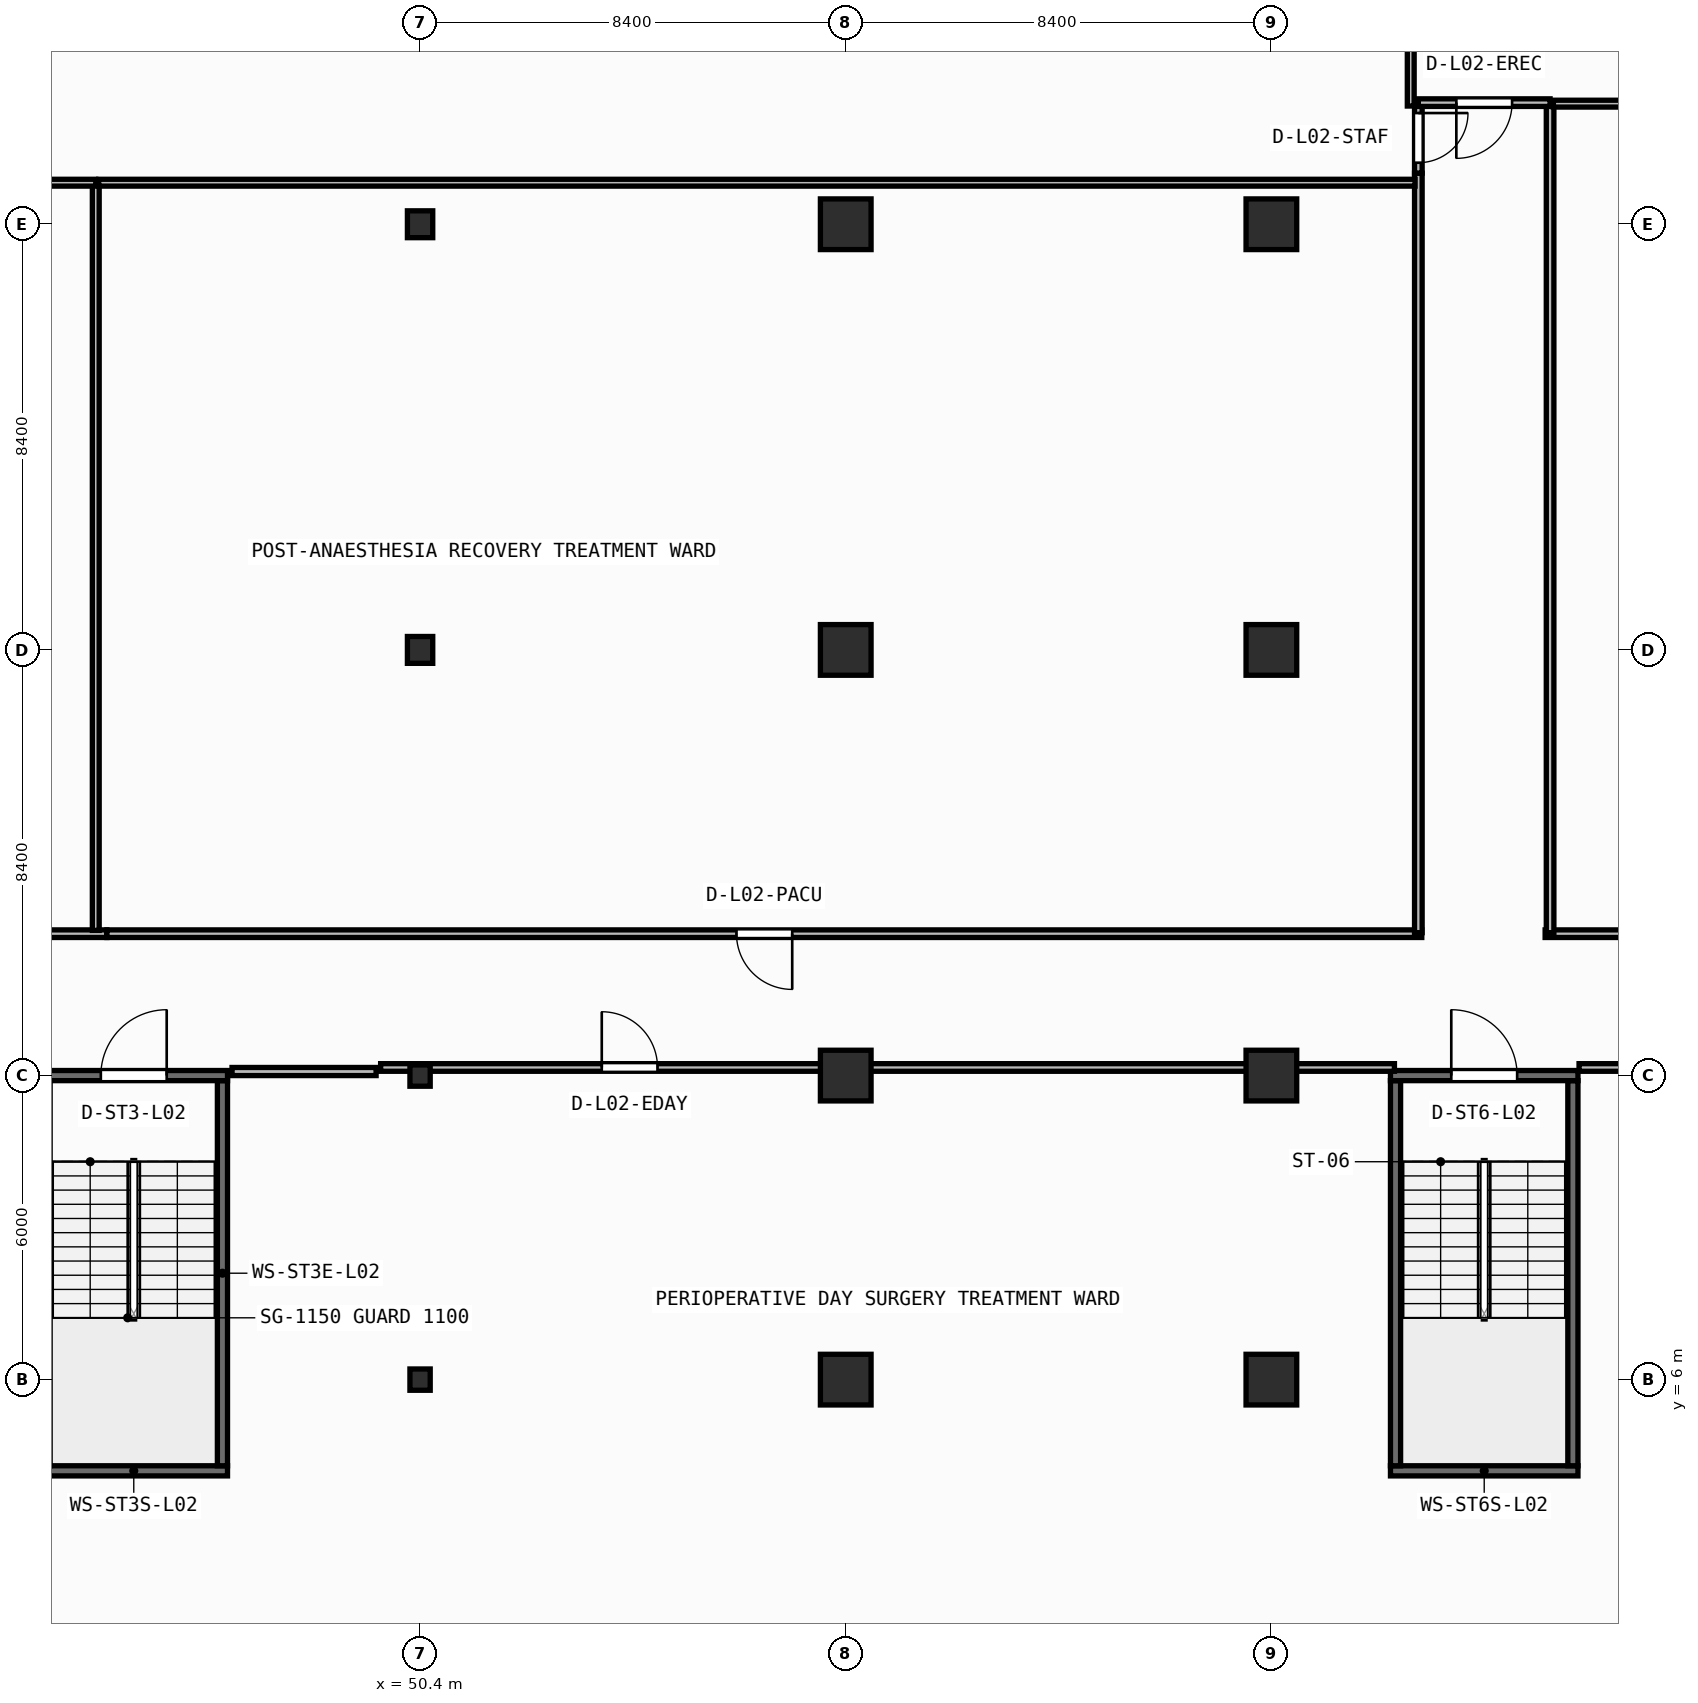
"""IFC4 building model, lengths in metres.
Left out: names, types, materials, properties, quantities, classifications, styles, units other than length and angle.
Written with IfcOpenShell. Run it as: python <this file> out.ifc"""

import sys

from ifc_helpers import new_model, si_unit, direction, frame, frame_2d, origin, origin_2d, place, context, subcontext, project, spatial, rectangle, circle, i_section, extrude, element, fill, save


model = new_model("IFC4")
c1 = context("Model", 3, precision=1e-05, world=origin(), true_north=direction((0.0, 1.0)))
c2 = subcontext(c1, "Body", "Model", "MODEL_VIEW")
j1 = project(units=[si_unit("LENGTHUNIT", "METRE"), si_unit("PLANEANGLEUNIT", "RADIAN")], contexts=[c1])
p1 = place(None, origin())
s1 = spatial("IfcSite", under=j1, at=p1, CompositionType="ELEMENT")
p2 = place(p1, origin())
s2 = spatial("IfcBuilding", under=s1, at=p2, CompositionType="ELEMENT")
p3 = place(p2, frame((0.0, 0.0, 9.0)))
s3 = spatial("IfcBuildingStorey", under=s2, at=p3, CompositionType="ELEMENT", Elevation=9.0)
p4 = place(p3, frame((50.4, 6.0, 0.0), z_axis=(0.0, 0.0, 1.0), x_axis=(1.0, 0.0, 0.0)))
e1 = element("IfcColumn", 1, at=p4, inside=s3, PredefinedType="COLUMN", context=c2, shape_type="SweptSolid", body=[
    extrude(i_section(OverallWidth=0.4, OverallDepth=0.42, WebThickness=0.025, FlangeThickness=0.04, at=origin_2d()), origin(), (0.0, 0.0, 1.0), 4.5),
])
for number, where, z_axis, x_axis in (
    (2, (58.8, 6.0, 0.0), (0.0, 0.0, 1.0), (1.0, 0.0, 0.0)),
    (3, (67.2, 6.0, 0.0), (0.0, 0.0, 1.0), (1.0, 0.0, 0.0)),
):
    element("IfcColumn", number, at=place(p3, frame(where, z_axis=z_axis, x_axis=x_axis)), inside=s3, PredefinedType="COLUMN", context=c2, shape_type="SweptSolid", body=[
        extrude(circle(Radius=0.5, at=origin_2d()), origin(), (0.0, 0.0, 1.0), 4.5),
    ])
p5 = place(p3, frame((50.4, 12.0, 0.0), z_axis=(0.0, 0.0, 1.0), x_axis=(1.0, 0.0, 0.0)))
e4 = element("IfcColumn", 4, at=p5, inside=s3, PredefinedType="COLUMN", context=c2, shape_type="SweptSolid", body=[
    extrude(i_section(OverallWidth=0.4, OverallDepth=0.42, WebThickness=0.025, FlangeThickness=0.04, at=origin_2d()), origin(), (0.0, 0.0, 1.0), 4.5),
])
for number, where, z_axis, x_axis in (
    (5, (58.8, 12.0, 0.0), (0.0, 0.0, 1.0), (1.0, 0.0, 0.0)),
    (6, (67.2, 12.0, 0.0), (0.0, 0.0, 1.0), (1.0, 0.0, 0.0)),
):
    element("IfcColumn", number, at=place(p3, frame(where, z_axis=z_axis, x_axis=x_axis)), inside=s3, PredefinedType="COLUMN", context=c2, shape_type="SweptSolid", body=[
        extrude(circle(Radius=0.5, at=origin_2d()), origin(), (0.0, 0.0, 1.0), 4.5),
    ])
p6 = place(p3, frame((50.4, 20.4, 0.0), z_axis=(0.0, 0.0, 1.0), x_axis=(1.0, 0.0, 0.0)))
e7 = element("IfcColumn", 7, at=p6, inside=s3, PredefinedType="COLUMN", context=c2, shape_type="SweptSolid", body=[
    extrude(i_section(OverallWidth=0.5, OverallDepth=0.53, WebThickness=0.028, FlangeThickness=0.045, at=origin_2d()), origin(), (0.0, 0.0, 1.0), 4.5),
])
for number, where, z_axis, x_axis in (
    (8, (58.8, 20.4, 0.0), (0.0, 0.0, 1.0), (1.0, 0.0, 0.0)),
    (9, (67.2, 20.4, 0.0), (0.0, 0.0, 1.0), (1.0, 0.0, 0.0)),
):
    element("IfcColumn", number, at=place(p3, frame(where, z_axis=z_axis, x_axis=x_axis)), inside=s3, PredefinedType="COLUMN", context=c2, shape_type="SweptSolid", body=[
        extrude(circle(Radius=0.5, at=origin_2d()), origin(), (0.0, 0.0, 1.0), 4.5),
    ])
p7 = place(p3, frame((50.4, 28.8, 0.0), z_axis=(0.0, 0.0, 1.0), x_axis=(1.0, 0.0, 0.0)))
e10 = element("IfcColumn", 10, at=p7, inside=s3, PredefinedType="COLUMN", context=c2, shape_type="SweptSolid", body=[
    extrude(i_section(OverallWidth=0.5, OverallDepth=0.53, WebThickness=0.028, FlangeThickness=0.045, at=origin_2d()), origin(), (0.0, 0.0, 1.0), 4.5),
])
for number, where, z_axis, x_axis in (
    (11, (58.8, 28.8, 0.0), (0.0, 0.0, 1.0), (1.0, 0.0, 0.0)),
    (12, (67.2, 28.8, 0.0), (0.0, 0.0, 1.0), (1.0, 0.0, 0.0)),
):
    element("IfcColumn", number, at=place(p3, frame(where, z_axis=z_axis, x_axis=x_axis)), inside=s3, PredefinedType="COLUMN", context=c2, shape_type="SweptSolid", body=[
        extrude(circle(Radius=0.5, at=origin_2d()), origin(), (0.0, 0.0, 1.0), 4.5),
    ])
p8 = place(p3, frame((42.9, 4.2, 0.0), z_axis=(0.0, 0.0, 1.0), x_axis=(1.0, 0.0, 0.0)))
e13 = element("IfcWall", 13, at=p8, inside=s3, PredefinedType="SHEAR", context=c2, shape_type="SweptSolid", body=[
    extrude(rectangle(XDim=3.7, YDim=0.2, at=frame_2d((1.85, 0.0))), origin(), (0.0, 0.0, 1.0), 4.25),
])
p9 = place(p3, frame((46.5, 4.3, 0.0), z_axis=(0.0, 0.0, 1.0), x_axis=(0.0, 1.0, 0.0)))
e14 = element("IfcWall", 14, at=p9, inside=s3, PredefinedType="SHEAR", context=c2, shape_type="SweptSolid", body=[
    extrude(rectangle(XDim=7.6, YDim=0.2, at=frame_2d((3.8, 0.0))), origin(), (0.0, 0.0, 1.0), 4.25),
])
p10 = place(p3, frame((42.9, 12.0, 0.0), z_axis=(0.0, 0.0, 1.0), x_axis=(1.0, 0.0, 0.0)))
e15 = element("IfcWall", 15, at=p10, inside=s3, PredefinedType="SHEAR", context=c2, shape_type="SweptSolid", body=[
    extrude(rectangle(XDim=3.7, YDim=0.2, at=frame_2d((1.85, 0.0))), origin(), (0.0, 0.0, 1.0), 4.25),
])
p11 = place(p10, frame((1.2, 0.0, 0.0)))
e16 = element("IfcOpeningElement", 16, at=p11, cuts=e15, PredefinedType="OPENING", context=c2, shape_type="SweptSolid", body=[
    extrude(rectangle(XDim=1.3, YDim=2.15, at=frame_2d((0.65, 1.075))), frame((0.0, 0.11, 0.0), z_axis=(0.0, -1.0, 0.0), x_axis=(1.0, 0.0, 0.0)), (0.0, 0.0, 1.0), 0.22),
])
p12 = place(p3, frame((69.55, 4.2, 0.0), z_axis=(0.0, 0.0, 1.0), x_axis=(1.0, 0.0, 0.0)))
e17 = element("IfcWall", 17, at=p12, inside=s3, PredefinedType="SHEAR", context=c2, shape_type="SweptSolid", body=[
    extrude(rectangle(XDim=3.7, YDim=0.2, at=frame_2d((1.85, 0.0))), origin(), (0.0, 0.0, 1.0), 4.25),
])
for number, where, z_axis, x_axis in (
    (18, (69.65, 4.3, 0.0), (0.0, 0.0, 1.0), (0.0, 1.0, 0.0)),
    (19, (73.15, 4.3, 0.0), (0.0, 0.0, 1.0), (0.0, 1.0, 0.0)),
):
    element("IfcWall", number, at=place(p3, frame(where, z_axis=z_axis, x_axis=x_axis)), inside=s3, PredefinedType="SHEAR", context=c2, shape_type="SweptSolid", body=[
        extrude(rectangle(XDim=7.6, YDim=0.2, at=frame_2d((3.8, 0.0))), origin(), (0.0, 0.0, 1.0), 4.25),
    ])
p13 = place(p3, frame((69.55, 12.0, 0.0), z_axis=(0.0, 0.0, 1.0), x_axis=(1.0, 0.0, 0.0)))
e20 = element("IfcWall", 20, at=p13, inside=s3, PredefinedType="SHEAR", context=c2, shape_type="SweptSolid", body=[
    extrude(rectangle(XDim=3.7, YDim=0.2, at=frame_2d((1.85, 0.0))), origin(), (0.0, 0.0, 1.0), 4.25),
])
p14 = place(p13, frame((1.2, 0.0, 0.0)))
e21 = element("IfcOpeningElement", 21, at=p14, cuts=e20, PredefinedType="OPENING", context=c2, shape_type="SweptSolid", body=[
    extrude(rectangle(XDim=1.3, YDim=2.15, at=frame_2d((0.65, 1.075))), frame((0.0, 0.11, 0.0), z_axis=(0.0, -1.0, 0.0), x_axis=(1.0, 0.0, 0.0)), (0.0, 0.0, 1.0), 0.22),
])
p15 = place(p3, frame((49.622, 12.16, 0.0), z_axis=(0.0, 0.0, 1.0), x_axis=(1.0, 0.0, 0.0)))
e22 = element("IfcWall", 22, at=p15, inside=s3, PredefinedType="PARTITIONING", context=c2, shape_type="SweptSolid", body=[
    extrude(rectangle(XDim=20.007, YDim=0.15, at=frame_2d((10.003, 0.0))), origin(), (0.0, 0.0, 1.0), 3.425),
])
p16 = place(p15, frame((4.364, 0.0, 0.0)))
e23 = element("IfcOpeningElement", 23, at=p16, cuts=e22, PredefinedType="OPENING", context=c2, shape_type="SweptSolid", body=[
    extrude(rectangle(XDim=1.1, YDim=2.1, at=frame_2d((0.55, 1.05))), frame((0.0, 0.085, 0.0), z_axis=(0.0, -1.0, 0.0), x_axis=(1.0, 0.0, 0.0)), (0.0, 0.0, 1.0), 0.17),
])
p17 = place(p3, frame((73.271, 12.16, 0.0), z_axis=(0.0, 0.0, 1.0), x_axis=(1.0, 0.0, 0.0)))
e24 = element("IfcWall", 24, at=p17, inside=s3, PredefinedType="PARTITIONING", context=c2, shape_type="SweptSolid", body=[
    extrude(rectangle(XDim=11.229, YDim=0.15, at=frame_2d((5.614, 0.0))), origin(), (0.0, 0.0, 1.0), 3.425),
])
p18 = place(p17, frame((6.037, 0.0, 0.0)))
e25 = element("IfcOpeningElement", 25, at=p18, cuts=e24, PredefinedType="OPENING", context=c2, shape_type="SweptSolid", body=[
    extrude(rectangle(XDim=1.1, YDim=2.1, at=frame_2d((0.55, 1.05))), frame((0.0, 0.085, 0.0), z_axis=(0.0, -1.0, 0.0), x_axis=(1.0, 0.0, 0.0)), (0.0, 0.0, 1.0), 0.17),
])
p19 = place(p3, frame((44.218, 14.8, 0.0), z_axis=(0.0, 0.0, 1.0), x_axis=(-1.0, 0.0, 0.0)))
e26 = element("IfcWall", 26, at=p19, inside=s3, PredefinedType="PARTITIONING", context=c2, shape_type="SweptSolid", body=[
    extrude(rectangle(XDim=22.998, YDim=0.15, at=frame_2d((11.499, 0.0))), origin(), (0.0, 0.0, 1.0), 4.25),
])
p20 = place(p19, frame((10.949, 0.0, 0.0)))
e27 = element("IfcOpeningElement", 27, at=p20, cuts=e26, PredefinedType="OPENING", context=c2, shape_type="SweptSolid", body=[
    extrude(rectangle(XDim=1.1, YDim=2.1, at=frame_2d((0.55, 1.05))), frame((0.0, 0.085, 0.0), z_axis=(0.0, -1.0, 0.0), x_axis=(1.0, 0.0, 0.0)), (0.0, 0.0, 1.0), 0.17),
])
p21 = place(p3, frame((70.168, 14.8, 0.0), z_axis=(0.0, 0.0, 1.0), x_axis=(-1.0, 0.0, 0.0)))
e28 = element("IfcWall", 28, at=p21, inside=s3, PredefinedType="PARTITIONING", context=c2, shape_type="SweptSolid", body=[
    extrude(rectangle(XDim=25.948, YDim=0.15, at=frame_2d((12.974, 0.0))), origin(), (0.0, 0.0, 1.0), 4.25),
])
p22 = place(p21, frame((12.424, 0.0, 0.0)))
e29 = element("IfcOpeningElement", 29, at=p22, cuts=e28, PredefinedType="OPENING", context=c2, shape_type="SweptSolid", body=[
    extrude(rectangle(XDim=1.1, YDim=2.1, at=frame_2d((0.55, 1.05))), frame((0.0, 0.085, 0.0), z_axis=(0.0, -1.0, 0.0), x_axis=(1.0, 0.0, 0.0)), (0.0, 0.0, 1.0), 0.17),
])
p23 = place(p3, frame((84.5, 14.8, 0.0), z_axis=(0.0, 0.0, 1.0), x_axis=(-1.0, 0.0, 0.0)))
e30 = element("IfcWall", 30, at=p23, inside=s3, PredefinedType="PARTITIONING", context=c2, shape_type="SweptSolid", body=[
    extrude(rectangle(XDim=11.898, YDim=0.15, at=frame_2d((5.949, 0.0))), origin(), (0.0, 0.0, 1.0), 4.25),
])
p24 = place(p23, frame((5.399, 0.0, 0.0)))
e31 = element("IfcOpeningElement", 31, at=p24, cuts=e30, PredefinedType="OPENING", context=c2, shape_type="SweptSolid", body=[
    extrude(rectangle(XDim=1.1, YDim=2.1, at=frame_2d((0.55, 1.05))), frame((0.0, 0.085, 0.0), z_axis=(0.0, -1.0, 0.0), x_axis=(1.0, 0.0, 0.0)), (0.0, 0.0, 1.0), 0.17),
])
p25 = place(p3, frame((70.1, 29.807, 0.0), z_axis=(0.0, 0.0, 1.0), x_axis=(0.0, -1.0, 0.0)))
e32 = element("IfcWall", 32, at=p25, inside=s3, PredefinedType="PARTITIONING", context=c2, shape_type="SweptSolid", body=[
    extrude(rectangle(XDim=14.987, YDim=0.15, at=frame_2d((7.494, 0.0))), origin(), (0.0, 0.0, 1.0), 4.25),
])
p26 = place(p3, frame((72.7, 14.82, 0.0), z_axis=(0.0, 0.0, 1.0), x_axis=(0.0, 1.0, 0.0)))
e33 = element("IfcWall", 33, at=p26, inside=s3, PredefinedType="PARTITIONING", context=c2, shape_type="SweptSolid", body=[
    extrude(rectangle(XDim=16.38, YDim=0.15, at=frame_2d((8.19, 0.0))), origin(), (0.0, 0.0, 1.0), 4.25),
])
p27 = place(p3, frame((70.1, 31.2, 0.0), z_axis=(0.0, 0.0, 1.0), x_axis=(0.0, -1.0, 0.0)))
e34 = element("IfcWall", 34, at=p27, inside=s3, PredefinedType="PARTITIONING", context=c2, shape_type="SweptSolid", body=[
    extrude(rectangle(XDim=1.391, YDim=0.15, at=frame_2d((0.695, 0.0))), origin(), (0.0, 0.0, 1.0), 4.25),
])
p28 = place(p27, frame((0.205, 0.0, 0.0)))
e35 = element("IfcOpeningElement", 35, at=p28, cuts=e34, PredefinedType="OPENING", context=c2, shape_type="SweptSolid", body=[
    extrude(rectangle(XDim=0.98, YDim=2.1, at=frame_2d((0.49, 1.05))), frame((0.0, 0.085, 0.0), z_axis=(0.0, -1.0, 0.0), x_axis=(1.0, 0.0, 0.0)), (0.0, 0.0, 1.0), 0.17),
])
p29 = place(p3, frame((72.7, 31.2, 0.0), z_axis=(0.0, 0.0, 1.0), x_axis=(-1.0, 0.0, 0.0)))
e36 = element("IfcWall", 36, at=p29, inside=s3, PredefinedType="PARTITIONING", context=c2, shape_type="SweptSolid", body=[
    extrude(rectangle(XDim=2.6, YDim=0.15, at=frame_2d((1.3, 0.0))), origin(), (0.0, 0.0, 1.0), 4.25),
])
p30 = place(p29, frame((0.75, 0.0, 0.0)))
e37 = element("IfcOpeningElement", 37, at=p30, cuts=e36, PredefinedType="OPENING", context=c2, shape_type="SweptSolid", body=[
    extrude(rectangle(XDim=1.1, YDim=2.1, at=frame_2d((0.55, 1.05))), frame((0.0, 0.085, 0.0), z_axis=(0.0, -1.0, 0.0), x_axis=(1.0, 0.0, 0.0)), (0.0, 0.0, 1.0), 0.17),
])
p31 = place(p3, frame((44.0, 14.865, 0.0), z_axis=(0.0, 0.0, 1.0), x_axis=(0.0, 1.0, 0.0)))
e38 = element("IfcWall", 38, at=p31, inside=s3, PredefinedType="PARTITIONING", context=c2, shape_type="SweptSolid", body=[
    extrude(rectangle(XDim=14.755, YDim=0.135, at=frame_2d((7.377, 0.0))), origin(), (0.0, 0.0, 1.0), 4.25),
])
p32 = place(p3, frame((44.0, 29.62, 0.0), z_axis=(0.0, 0.0, 1.0), x_axis=(-1.0, 0.0, 0.0)))
e39 = element("IfcWall", 39, at=p32, inside=s3, PredefinedType="PARTITIONING", context=c2, shape_type="SweptSolid", body=[
    extrude(rectangle(XDim=4.258, YDim=0.135, at=frame_2d((2.129, 0.0))), origin(), (0.0, 0.0, 1.0), 4.25),
])
p33 = place(p3, frame((70.035, 29.62, 0.0), z_axis=(0.0, 0.0, 1.0), x_axis=(-1.0, 0.0, 0.0)))
e40 = element("IfcWall", 40, at=p33, inside=s3, PredefinedType="PARTITIONING", context=c2, shape_type="SweptSolid", body=[
    extrude(rectangle(XDim=25.977, YDim=0.135, at=frame_2d((12.989, 0.0))), origin(), (0.0, 0.0, 1.0), 4.25),
])
p34 = place(p3, frame((86.84, 31.18, 0.0), z_axis=(0.0, 0.0, 1.0), x_axis=(-1.0, 0.0, 0.0)))
e41 = element("IfcWall", 41, at=p34, inside=s3, PredefinedType="PARTITIONING", context=c2, shape_type="SweptSolid", body=[
    extrude(rectangle(XDim=14.075, YDim=0.135, at=frame_2d((7.038, 0.0))), origin(), (0.0, 0.0, 1.0), 4.25),
])
p35 = place(p3, frame((69.95, 31.133, 0.0), z_axis=(0.0, 0.0, 1.0), x_axis=(0.0, 1.0, 0.0)))
e42 = element("IfcWall", 42, at=p35, inside=s3, PredefinedType="PARTITIONING", context=c2, shape_type="SweptSolid", body=[
    extrude(rectangle(XDim=15.507, YDim=0.135, at=frame_2d((7.753, 0.0))), origin(), (0.0, 0.0, 1.0), 4.25),
])
p36 = place(p3, frame((46.689, 12.08, 0.0), z_axis=(0.0, 0.0, 1.0), x_axis=(1.0, 0.0, 0.0)))
e43 = element("IfcWall", 43, at=p36, inside=s3, PredefinedType="PARTITIONING", context=c2, shape_type="SweptSolid", body=[
    extrude(rectangle(XDim=2.843, YDim=0.16, at=frame_2d((1.421, 0.0))), origin(), (0.0, 0.0, 1.0), 3.425),
])
p37 = place(p11, origin())
e44 = element("IfcDoor", 44, at=p37, inside=s3, OperationType="SINGLE_SWING_RIGHT", PredefinedType="DOOR", context=c2, shape_type="SweptSolid", body=[
    extrude(rectangle(XDim=1.3, YDim=2.15, at=frame_2d((0.65, 1.075))), frame((0.0, 0.025, 0.0), z_axis=(0.0, -1.0, 0.0), x_axis=(1.0, 0.0, 0.0)), (0.0, 0.0, 1.0), 0.05),
])
fill(e16, e44)
p38 = place(p14, origin())
e45 = element("IfcDoor", 45, at=p38, inside=s3, OperationType="SINGLE_SWING_LEFT", PredefinedType="DOOR", context=c2, shape_type="SweptSolid", body=[
    extrude(rectangle(XDim=1.3, YDim=2.15, at=frame_2d((0.65, 1.075))), frame((0.0, 0.025, 0.0), z_axis=(0.0, -1.0, 0.0), x_axis=(1.0, 0.0, 0.0)), (0.0, 0.0, 1.0), 0.05),
])
fill(e21, e45)
p39 = place(p16, origin())
e46 = element("IfcDoor", 46, at=p39, inside=s3, OperationType="SINGLE_SWING_LEFT", PredefinedType="DOOR", context=c2, shape_type="SweptSolid", body=[
    extrude(rectangle(XDim=1.1, YDim=2.1, at=frame_2d((0.55, 1.05))), frame((0.0, 0.025, 0.0), z_axis=(0.0, -1.0, 0.0), x_axis=(1.0, 0.0, 0.0)), (0.0, 0.0, 1.0), 0.05),
])
fill(e23, e46)
p40 = place(p22, origin())
e47 = element("IfcDoor", 47, at=p40, inside=s3, OperationType="SINGLE_SWING_LEFT", PredefinedType="DOOR", context=c2, shape_type="SweptSolid", body=[
    extrude(rectangle(XDim=1.1, YDim=2.1, at=frame_2d((0.55, 1.05))), frame((0.0, 0.025, 0.0), z_axis=(0.0, -1.0, 0.0), x_axis=(1.0, 0.0, 0.0)), (0.0, 0.0, 1.0), 0.05),
])
fill(e29, e47)
p41 = place(p28, origin())
e48 = element("IfcDoor", 48, at=p41, inside=s3, OperationType="SINGLE_SWING_LEFT", PredefinedType="DOOR", context=c2, shape_type="SweptSolid", body=[
    extrude(rectangle(XDim=0.98, YDim=2.1, at=frame_2d((0.49, 1.05))), frame((0.0, 0.025, 0.0), z_axis=(0.0, -1.0, 0.0), x_axis=(1.0, 0.0, 0.0)), (0.0, 0.0, 1.0), 0.05),
])
fill(e35, e48)
p42 = place(p30, origin())
e49 = element("IfcDoor", 49, at=p42, inside=s3, OperationType="SINGLE_SWING_RIGHT", PredefinedType="DOOR", context=c2, shape_type="SweptSolid", body=[
    extrude(rectangle(XDim=1.1, YDim=2.1, at=frame_2d((0.55, 1.05))), frame((0.0, 0.025, 0.0), z_axis=(0.0, -1.0, 0.0), x_axis=(1.0, 0.0, 0.0)), (0.0, 0.0, 1.0), 0.05),
])
fill(e37, e49)
save(model, sys.argv[1])
